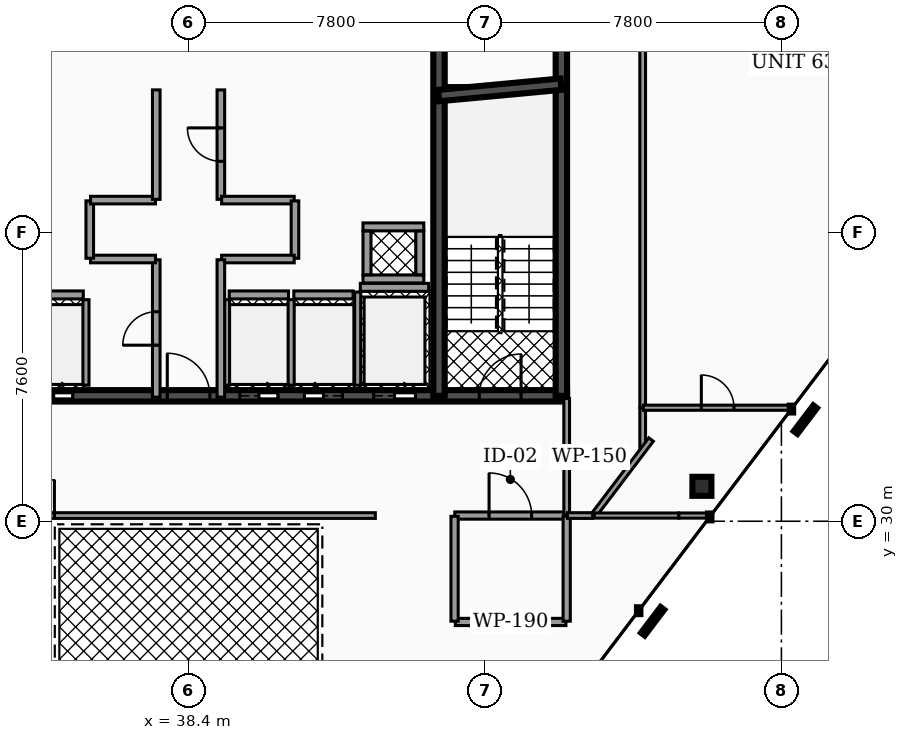
"""IFC4 building model, lengths in metres.
Left out: names, types, materials, properties, quantities, classifications, styles, units other than length and angle.
Written with IfcOpenShell. Run it as: python <this file> out.ifc"""

import sys

from ifc_helpers import new_model, si_unit, direction, frame, frame_2d, origin, origin_2d, place, context, subcontext, project, spatial, rectangle, hollow_rectangle, extrude, element, fill, save


model = new_model("IFC4")
c1 = context("Model", 3, precision=1e-05, world=origin(), true_north=direction((0.0, 1.0)))
c2 = subcontext(c1, "Body", "Model", "MODEL_VIEW")
j1 = project(units=[si_unit("LENGTHUNIT", "METRE"), si_unit("PLANEANGLEUNIT", "RADIAN")], contexts=[c1])
p1 = place(None, origin())
s1 = spatial("IfcSite", under=j1, at=p1, CompositionType="ELEMENT")
p2 = place(p1, origin())
s2 = spatial("IfcBuilding", under=s1, at=p2, CompositionType="ELEMENT")
p3 = place(p2, frame((0.0, 0.0, 249.56)))
s3 = spatial("IfcBuildingStorey", under=s2, at=p3, CompositionType="ELEMENT", Elevation=249.56)
p4 = place(p3, frame((28.5, 33.3, 0.0), z_axis=(0.0, 0.0, 1.0), x_axis=(1.0, 0.0, 0.0)))
e1 = element("IfcWall", 1, at=p4, inside=s3, PredefinedType="SHEAR", context=c2, shape_type="SweptSolid", body=[
    extrude(rectangle(XDim=19.86, YDim=0.3, at=frame_2d((9.93, 0.0))), origin(), (0.0, 0.0, 1.0), 3.05),
])
p5 = place(p4, frame((3.93, 0.0, 0.0)))
e2 = element("IfcOpeningElement", 2, at=p5, cuts=e1, PredefinedType="OPENING", context=c2, shape_type="SweptSolid", body=[
    extrude(rectangle(XDim=1.1, YDim=2.15, at=frame_2d((0.55, 1.075))), frame((0.0, 0.16, 0.0), z_axis=(0.0, -1.0, 0.0), x_axis=(1.0, 0.0, 0.0)), (0.0, 0.0, 1.0), 0.32),
])
p6 = place(p4, frame((14.77, 0.0, 0.0)))
e3 = element("IfcOpeningElement", 3, at=p6, cuts=e1, PredefinedType="OPENING", context=c2, shape_type="SweptSolid", body=[
    extrude(rectangle(XDim=1.1, YDim=2.15, at=frame_2d((0.55, 1.075))), frame((0.0, 0.16, 0.0), z_axis=(0.0, -1.0, 0.0), x_axis=(1.0, 0.0, 0.0)), (0.0, 0.0, 1.0), 0.32),
])
p7 = place(p4, frame((11.25, 0.0, 0.0)))
e4 = element("IfcOpeningElement", 4, at=p7, cuts=e1, PredefinedType="OPENING", context=c2, shape_type="SweptSolid", body=[
    extrude(rectangle(XDim=1.0, YDim=2.1, at=frame_2d((0.5, 1.05))), frame((0.0, 0.16, 0.0), z_axis=(0.0, -1.0, 0.0), x_axis=(1.0, 0.0, 0.0)), (0.0, 0.0, 1.0), 0.32),
])
p8 = place(p4, frame((12.95, 0.0, 0.0)))
e5 = element("IfcOpeningElement", 5, at=p8, cuts=e1, PredefinedType="OPENING", context=c2, shape_type="SweptSolid", body=[
    extrude(rectangle(XDim=1.0, YDim=2.1, at=frame_2d((0.5, 1.05))), frame((0.0, 0.16, 0.0), z_axis=(0.0, -1.0, 0.0), x_axis=(1.0, 0.0, 0.0)), (0.0, 0.0, 1.0), 0.32),
])
p9 = place(p4, frame((5.85, 0.0, 0.0)))
e6 = element("IfcOpeningElement", 6, at=p9, cuts=e1, PredefinedType="OPENING", context=c2, shape_type="SweptSolid", body=[
    extrude(rectangle(XDim=1.0, YDim=2.1, at=frame_2d((0.5, 1.05))), frame((0.0, 0.16, 0.0), z_axis=(0.0, -1.0, 0.0), x_axis=(1.0, 0.0, 0.0)), (0.0, 0.0, 1.0), 0.32),
])
p10 = place(p4, frame((1.21, 0.0, 0.0)))
e7 = element("IfcOpeningElement", 7, at=p10, cuts=e1, PredefinedType="OPENING", context=c2, shape_type="SweptSolid", body=[
    extrude(rectangle(XDim=1.1, YDim=2.2, at=frame_2d((0.55, 1.1))), frame((0.0, 0.16, 0.0), z_axis=(0.0, -1.0, 0.0), x_axis=(1.0, 0.0, 0.0)), (0.0, 0.0, 1.0), 0.32),
])
p11 = place(p4, frame((9.34, 0.0, 0.0)))
e8 = element("IfcOpeningElement", 8, at=p11, cuts=e1, PredefinedType="OPENING", context=c2, shape_type="SweptSolid", body=[
    extrude(rectangle(XDim=1.12, YDim=2.05, at=frame_2d((0.56, 1.025))), frame((0.0, 0.16, 0.0), z_axis=(0.0, -1.0, 0.0), x_axis=(1.0, 0.0, 0.0)), (0.0, 0.0, 1.0), 0.32),
])
p12 = place(p4, frame((17.55, 0.0, 0.0)))
e9 = element("IfcOpeningElement", 9, at=p12, cuts=e1, PredefinedType="OPENING", context=c2, shape_type="SweptSolid", body=[
    extrude(rectangle(XDim=1.1, YDim=2.2, at=frame_2d((0.55, 1.1))), frame((0.0, 0.16, 0.0), z_axis=(0.0, -1.0, 0.0), x_axis=(1.0, 0.0, 0.0)), (0.0, 0.0, 1.0), 0.32),
])
for number, where, z_axis, x_axis in (
    (10, (44.99, 33.3, 0.0), (0.0, 0.0, 1.0), (0.0, 1.0, 0.0)),
    (11, (48.21, 33.3, 0.0), (0.0, 0.0, 1.0), (0.0, 1.0, 0.0)),
):
    element("IfcWall", number, at=place(p3, frame(where, z_axis=z_axis, x_axis=x_axis)), inside=s3, PredefinedType="SHEAR", context=c2, shape_type="SweptSolid", body=[
        extrude(rectangle(XDim=10.1, YDim=0.3, at=frame_2d((5.05, 0.0))), origin(), (0.0, 0.0, 1.0), 3.05),
    ])
p13 = place(p3, frame((44.98, 41.2, 0.0), z_axis=(0.0, 0.0, 1.0), x_axis=(0.995686468965, 0.09278176286, 0.0)))
e12 = element("IfcWall", 12, at=p13, inside=s3, PredefinedType="SHEAR", context=c2, shape_type="SweptSolid", body=[
    extrude(rectangle(XDim=3.234, YDim=0.3, at=frame_2d((1.617, 0.0))), origin(), (0.0, 0.0, 1.0), 3.05),
])
p14 = place(p3, frame((51.909, 30.919, 0.0), z_axis=(-0.029348226726, 0.032546943535, 0.999039227485), x_axis=(-0.742658689726, -0.669670120712, 0.0)))
e13 = element("IfcColumn", 13, at=p14, inside=s3, PredefinedType="COLUMN", context=c2, shape_type="SweptSolid", body=[
    extrude(hollow_rectangle(XDim=0.5, YDim=0.5, WallThickness=0.025, at=origin_2d()), origin(), (0.0, 0.0, 1.0), 3.053),
])
p15 = place(p3, frame((42.92, 36.155, 0.0), z_axis=(0.0, 0.0, 1.0), x_axis=(1.0, 0.0, 0.0)))
e14 = element("IfcWall", 14, at=p15, inside=s3, PredefinedType="SOLIDWALL", context=c2, shape_type="SweptSolid", body=[
    extrude(rectangle(XDim=1.8, YDim=0.21, at=frame_2d((0.9, 0.0))), origin(), (0.0, 0.0, 1.0), 3.05),
])
p16 = place(p3, frame((42.85, 33.58, 0.0), z_axis=(0.0, 0.0, 1.0), x_axis=(0.0, 1.0, 0.0)))
e15 = element("IfcWall", 15, at=p16, inside=s3, PredefinedType="SOLIDWALL", context=c2, shape_type="SweptSolid", body=[
    extrude(rectangle(XDim=2.45, YDim=0.16, at=frame_2d((1.225, 0.0))), origin(), (0.0, 0.0, 1.0), 3.05),
])
p17 = place(p3, frame((39.47, 35.955, 0.0), z_axis=(0.0, 0.0, 1.0), x_axis=(1.0, 0.0, 0.0)))
e16 = element("IfcWall", 16, at=p17, inside=s3, PredefinedType="SOLIDWALL", context=c2, shape_type="SweptSolid", body=[
    extrude(rectangle(XDim=1.56, YDim=0.21, at=frame_2d((0.78, 0.0))), origin(), (0.0, 0.0, 1.0), 3.05),
])
for number, where, z_axis, x_axis in (
    (17, (39.4, 33.58, 0.0), (0.0, 0.0, 1.0), (0.0, 1.0, 0.0)),
    (18, (41.1, 33.58, 0.0), (0.0, 0.0, 1.0), (0.0, 1.0, 0.0)),
):
    element("IfcWall", number, at=place(p3, frame(where, z_axis=z_axis, x_axis=x_axis)), inside=s3, PredefinedType="SOLIDWALL", context=c2, shape_type="SweptSolid", body=[
        extrude(rectangle(XDim=2.25, YDim=0.16, at=frame_2d((1.125, 0.0))), origin(), (0.0, 0.0, 1.0), 3.05),
    ])
p18 = place(p3, frame((41.17, 35.955, 0.0), z_axis=(0.0, 0.0, 1.0), x_axis=(1.0, 0.0, 0.0)))
e19 = element("IfcWall", 19, at=p18, inside=s3, PredefinedType="SOLIDWALL", context=c2, shape_type="SweptSolid", body=[
    extrude(rectangle(XDim=1.56, YDim=0.21, at=frame_2d((0.78, 0.0))), origin(), (0.0, 0.0, 1.0), 3.05),
])
p19 = place(p3, frame((34.07, 35.955, 0.0), z_axis=(0.0, 0.0, 1.0), x_axis=(1.0, 0.0, 0.0)))
e20 = element("IfcWall", 20, at=p19, inside=s3, PredefinedType="SOLIDWALL", context=c2, shape_type="SweptSolid", body=[
    extrude(rectangle(XDim=1.56, YDim=0.21, at=frame_2d((0.78, 0.0))), origin(), (0.0, 0.0, 1.0), 3.05),
])
p20 = place(p3, frame((35.7, 33.58, 0.0), z_axis=(0.0, 0.0, 1.0), x_axis=(0.0, 1.0, 0.0)))
e21 = element("IfcWall", 21, at=p20, inside=s3, PredefinedType="SOLIDWALL", context=c2, shape_type="SweptSolid", body=[
    extrude(rectangle(XDim=2.25, YDim=0.16, at=frame_2d((1.125, 0.0))), origin(), (0.0, 0.0, 1.0), 3.05),
])
for number, where, z_axis, x_axis in (
    (22, (42.99, 36.375, 0.0), (0.0, 0.0, 1.0), (1.0, 0.0, 0.0)),
    (23, (42.99, 37.745, 0.0), (0.0, 0.0, 1.0), (1.0, 0.0, 0.0)),
):
    element("IfcWall", number, at=place(p3, frame(where, z_axis=z_axis, x_axis=x_axis)), inside=s3, PredefinedType="SOLIDWALL", context=c2, shape_type="SweptSolid", body=[
        extrude(rectangle(XDim=1.6, YDim=0.21, at=frame_2d((0.8, 0.0))), origin(), (0.0, 0.0, 1.0), 3.05),
    ])
for number, where, z_axis, x_axis in (
    (24, (43.095, 36.485, 0.0), (0.0, 0.0, 1.0), (0.0, 1.0, 0.0)),
    (25, (44.485, 36.485, 0.0), (0.0, 0.0, 1.0), (0.0, 1.0, 0.0)),
):
    element("IfcWall", number, at=place(p3, frame(where, z_axis=z_axis, x_axis=x_axis)), inside=s3, PredefinedType="SOLIDWALL", context=c2, shape_type="SweptSolid", body=[
        extrude(rectangle(XDim=1.15, YDim=0.21, at=frame_2d((0.575, 0.0))), origin(), (0.0, 0.0, 1.0), 3.05),
    ])
p21 = place(p3, frame((37.55, 33.265, 0.0), z_axis=(0.0, 0.0, 1.0), x_axis=(0.0, 1.0, 0.0)))
e26 = element("IfcWall", 26, at=p21, inside=s3, PredefinedType="PARTITIONING", context=c2, shape_type="SweptSolid", body=[
    extrude(rectangle(XDim=3.615, YDim=0.2, at=frame_2d((1.808, 0.0))), origin(), (0.0, 0.0, 1.0), 2.2),
])
p22 = place(p21, frame((1.367, 0.0, 0.0)))
e27 = element("IfcOpeningElement", 27, at=p22, cuts=e26, PredefinedType="OPENING", context=c2, shape_type="SweptSolid", body=[
    extrude(rectangle(XDim=0.88, YDim=2.05, at=frame_2d((0.44, 1.025))), frame((0.0, 0.11, 0.0), z_axis=(0.0, -1.0, 0.0), x_axis=(1.0, 0.0, 0.0)), (0.0, 0.0, 1.0), 0.22),
])
p23 = place(p3, frame((35.82, 36.9, 0.0), z_axis=(0.0, 0.0, 1.0), x_axis=(1.0, 0.0, 0.0)))
e28 = element("IfcWall", 28, at=p23, inside=s3, PredefinedType="PARTITIONING", context=c2, shape_type="SweptSolid", body=[
    extrude(rectangle(XDim=1.71, YDim=0.2, at=frame_2d((0.855, 0.0))), origin(), (0.0, 0.0, 1.0), 2.2),
])
p24 = place(p3, frame((35.8, 36.92, 0.0), z_axis=(0.0, 0.0, 1.0), x_axis=(0.0, 1.0, 0.0)))
e29 = element("IfcWall", 29, at=p24, inside=s3, PredefinedType="PARTITIONING", context=c2, shape_type="SweptSolid", body=[
    extrude(rectangle(XDim=1.51, YDim=0.2, at=frame_2d((0.755, 0.0))), origin(), (0.0, 0.0, 1.0), 2.2),
])
p25 = place(p3, frame((35.82, 38.45, 0.0), z_axis=(0.0, 0.0, 1.0), x_axis=(1.0, 0.0, 0.0)))
e30 = element("IfcWall", 30, at=p25, inside=s3, PredefinedType="PARTITIONING", context=c2, shape_type="SweptSolid", body=[
    extrude(rectangle(XDim=1.71, YDim=0.2, at=frame_2d((0.855, 0.0))), origin(), (0.0, 0.0, 1.0), 2.2),
])
p26 = place(p3, frame((37.55, 38.47, 0.0), z_axis=(0.0, 0.0, 1.0), x_axis=(0.0, 1.0, 0.0)))
e31 = element("IfcWall", 31, at=p26, inside=s3, PredefinedType="PARTITIONING", context=c2, shape_type="SweptSolid", body=[
    extrude(rectangle(XDim=2.88, YDim=0.2, at=frame_2d((1.44, 0.0))), origin(), (0.0, 0.0, 1.0), 2.2),
])
p27 = place(p3, frame((39.25, 38.47, 0.0), z_axis=(0.0, 0.0, 1.0), x_axis=(0.0, 1.0, 0.0)))
e32 = element("IfcWall", 32, at=p27, inside=s3, PredefinedType="PARTITIONING", context=c2, shape_type="SweptSolid", body=[
    extrude(rectangle(XDim=2.88, YDim=0.2, at=frame_2d((1.44, 0.0))), origin(), (0.0, 0.0, 1.0), 2.2),
])
p28 = place(p27, frame((1.0, 0.0, 0.0)))
e33 = element("IfcOpeningElement", 33, at=p28, cuts=e32, PredefinedType="OPENING", context=c2, shape_type="SweptSolid", body=[
    extrude(rectangle(XDim=0.88, YDim=2.05, at=frame_2d((0.44, 1.025))), frame((0.0, 0.11, 0.0), z_axis=(0.0, -1.0, 0.0), x_axis=(1.0, 0.0, 0.0)), (0.0, 0.0, 1.0), 0.22),
])
p29 = place(p3, frame((39.27, 38.45, 0.0), z_axis=(0.0, 0.0, 1.0), x_axis=(1.0, 0.0, 0.0)))
e34 = element("IfcWall", 34, at=p29, inside=s3, PredefinedType="PARTITIONING", context=c2, shape_type="SweptSolid", body=[
    extrude(rectangle(XDim=1.91, YDim=0.2, at=frame_2d((0.955, 0.0))), origin(), (0.0, 0.0, 1.0), 2.2),
])
p30 = place(p3, frame((41.2, 36.92, 0.0), z_axis=(0.0, 0.0, 1.0), x_axis=(0.0, 1.0, 0.0)))
e35 = element("IfcWall", 35, at=p30, inside=s3, PredefinedType="PARTITIONING", context=c2, shape_type="SweptSolid", body=[
    extrude(rectangle(XDim=1.51, YDim=0.2, at=frame_2d((0.755, 0.0))), origin(), (0.0, 0.0, 1.0), 2.2),
])
p31 = place(p3, frame((39.27, 36.9, 0.0), z_axis=(0.0, 0.0, 1.0), x_axis=(1.0, 0.0, 0.0)))
e36 = element("IfcWall", 36, at=p31, inside=s3, PredefinedType="PARTITIONING", context=c2, shape_type="SweptSolid", body=[
    extrude(rectangle(XDim=1.91, YDim=0.2, at=frame_2d((0.955, 0.0))), origin(), (0.0, 0.0, 1.0), 2.2),
])
p32 = place(p3, frame((39.25, 33.265, 0.0), z_axis=(0.0, 0.0, 1.0), x_axis=(0.0, 1.0, 0.0)))
e37 = element("IfcWall", 37, at=p32, inside=s3, PredefinedType="PARTITIONING", context=c2, shape_type="SweptSolid", body=[
    extrude(rectangle(XDim=3.615, YDim=0.2, at=frame_2d((1.808, 0.0))), origin(), (0.0, 0.0, 1.0), 2.2),
])
p33 = place(p3, frame((45.405, 30.15, 0.0), z_axis=(0.0, 0.0, 1.0), x_axis=(1.0, 0.0, 0.0)))
e38 = element("IfcWall", 38, at=p33, inside=s3, PredefinedType="PARTITIONING", context=c2, shape_type="SweptSolid", body=[
    extrude(rectangle(XDim=2.925, YDim=0.19, at=frame_2d((1.462, 0.0))), origin(), (0.0, 0.0, 1.0), 2.2),
])
p34 = place(p33, frame((0.903, 0.0, 0.0)))
e39 = element("IfcOpeningElement", 39, at=p34, cuts=e38, PredefinedType="OPENING", context=c2, shape_type="SweptSolid", body=[
    extrude(rectangle(XDim=1.12, YDim=2.05, at=frame_2d((0.56, 1.025))), frame((0.0, 0.105, 0.0), z_axis=(0.0, -1.0, 0.0), x_axis=(1.0, 0.0, 0.0)), (0.0, 0.0, 1.0), 0.21),
])
p35 = place(p3, frame((48.35, 30.17, 0.0), z_axis=(0.0, 0.0, 1.0), x_axis=(0.0, 1.0, 0.0)))
e40 = element("IfcWall", 40, at=p35, inside=s3, PredefinedType="PARTITIONING", context=c2, shape_type="SweptSolid", body=[
    extrude(rectangle(XDim=3.06, YDim=0.15, at=frame_2d((1.53, 0.0))), origin(), (0.0, 0.0, 1.0), 2.2),
])
p36 = place(p3, frame((33.485, 30.15, 0.0), z_axis=(0.0, 0.0, 1.0), x_axis=(1.0, 0.0, 0.0)))
e41 = element("IfcWall", 41, at=p36, inside=s3, PredefinedType="PARTITIONING", context=c2, shape_type="SweptSolid", body=[
    extrude(rectangle(XDim=9.83, YDim=0.15, at=frame_2d((4.915, 0.0))), origin(), (0.0, 0.0, 1.0), 2.2),
])
p37 = place(p36, frame((0.445, 0.0, 0.0)))
e42 = element("IfcOpeningElement", 42, at=p37, cuts=e41, PredefinedType="OPENING", context=c2, shape_type="SweptSolid", body=[
    extrude(rectangle(XDim=0.94, YDim=2.05, at=frame_2d((0.47, 1.025))), frame((0.0, 0.085, 0.0), z_axis=(0.0, -1.0, 0.0), x_axis=(1.0, 0.0, 0.0)), (0.0, 0.0, 1.0), 0.17),
])
p38 = place(p3, frame((45.42, 27.35, 0.0), z_axis=(0.0, 0.0, 1.0), x_axis=(1.0, 0.0, 0.0)))
e43 = element("IfcWall", 43, at=p38, inside=s3, PredefinedType="PARTITIONING", context=c2, shape_type="SweptSolid", body=[
    extrude(rectangle(XDim=2.91, YDim=0.19, at=frame_2d((1.455, 0.0))), origin(), (0.0, 0.0, 1.0), 2.2),
])
for number, where, z_axis, x_axis in (
    (44, (45.4, 27.37, 0.0), (0.0, 0.0, 1.0), (0.0, 1.0, 0.0)),
    (45, (48.35, 27.37, 0.0), (0.0, 0.0, 1.0), (0.0, 1.0, 0.0)),
):
    element("IfcWall", number, at=place(p3, frame(where, z_axis=z_axis, x_axis=x_axis)), inside=s3, PredefinedType="PARTITIONING", context=c2, shape_type="SweptSolid", body=[
        extrude(rectangle(XDim=2.76, YDim=0.19, at=frame_2d((1.38, 0.0))), origin(), (0.0, 0.0, 1.0), 2.2),
    ])
p39 = place(p3, frame((48.37, 30.15, 0.0), z_axis=(0.0, 0.0, 1.0), x_axis=(1.0, 0.0, 0.0)))
e46 = element("IfcWall", 46, at=p39, inside=s3, PredefinedType="PARTITIONING", context=c2, shape_type="SweptSolid", body=[
    extrude(rectangle(XDim=0.665, YDim=0.15, at=frame_2d((0.333, 0.0))), origin(), (0.0, 0.0, 1.0), 2.2),
])
p40 = place(p3, frame((50.35, 32.992, 0.0), z_axis=(0.0, 0.0, 1.0), x_axis=(0.0, 1.0, 0.0)))
e47 = element("IfcWall", 47, at=p40, inside=s3, PredefinedType="PARTITIONING", context=c2, shape_type="SweptSolid", body=[
    extrude(rectangle(XDim=10.558, YDim=0.15, at=frame_2d((5.279, 0.0))), origin(), (0.0, 0.0, 1.0), 2.2),
])
p41 = place(p3, frame((50.35, 31.874, 0.0), z_axis=(0.0, 0.0, 1.0), x_axis=(0.0, 1.0, 0.0)))
e48 = element("IfcWall", 48, at=p41, inside=s3, PredefinedType="PARTITIONING", context=c2, shape_type="SweptSolid", body=[
    extrude(rectangle(XDim=1.109, YDim=0.15, at=frame_2d((0.554, 0.0))), origin(), (0.0, 0.0, 1.0), 2.2),
])
p42 = place(p3, frame((49.067, 30.166, 0.0), z_axis=(0.0, 0.0, 1.0), x_axis=(0.603916229015, 0.797047795513, 0.0)))
e49 = element("IfcWall", 49, at=p42, inside=s3, PredefinedType="PARTITIONING", context=c2, shape_type="SweptSolid", body=[
    extrude(rectangle(XDim=2.489, YDim=0.15, at=frame_2d((1.245, 0.0))), origin(), (0.0, 0.0, 1.0), 2.2),
])
p43 = place(p3, frame((49.075, 30.15, 0.0), z_axis=(0.0, 0.0, 1.0), x_axis=(1.0, 0.0, 0.0)))
e50 = element("IfcWall", 50, at=p43, inside=s3, PredefinedType="PARTITIONING", context=c2, shape_type="SweptSolid", body=[
    extrude(rectangle(XDim=2.225, YDim=0.135, at=frame_2d((1.112, 0.0))), origin(), (0.0, 0.0, 1.0), 2.2),
])
p44 = place(p3, frame((51.3, 30.15, 0.0), z_axis=(0.0, 0.0, 1.0), x_axis=(1.0, 0.0, 0.0)))
e51 = element("IfcWall", 51, at=p44, inside=s3, PredefinedType="PARTITIONING", context=c2, shape_type="SweptSolid", body=[
    extrude(rectangle(XDim=0.827, YDim=0.135, at=frame_2d((0.413, 0.0))), origin(), (0.0, 0.0, 1.0), 2.2),
])
p45 = place(p3, frame((50.37, 32.988, 0.0), z_axis=(0.0, 0.0, 1.0), x_axis=(1.0, 0.0, 0.0)))
e52 = element("IfcWall", 52, at=p45, inside=s3, PredefinedType="PARTITIONING", context=c2, shape_type="SweptSolid", body=[
    extrude(rectangle(XDim=3.906, YDim=0.135, at=frame_2d((1.953, 0.0))), origin(), (0.0, 0.0, 1.0), 2.2),
])
p46 = place(p45, frame((1.523, 0.0, 0.0)))
e53 = element("IfcOpeningElement", 53, at=p46, cuts=e52, PredefinedType="OPENING", context=c2, shape_type="SweptSolid", body=[
    extrude(rectangle(XDim=0.86, YDim=2.05, at=frame_2d((0.43, 1.025))), frame((0.0, 0.077, 0.0), z_axis=(0.0, -1.0, 0.0), x_axis=(1.0, 0.0, 0.0)), (0.0, 0.0, 1.0), 0.155),
])
p47 = place(p6, origin())
e54 = element("IfcDoor", 54, at=p47, inside=s3, OperationType="SLIDING_TO_RIGHT", PredefinedType="DOOR", context=c2, shape_type="SweptSolid", body=[
    extrude(rectangle(XDim=1.1, YDim=2.15, at=frame_2d((0.55, 1.075))), frame((0.0, 0.025, 0.0), z_axis=(0.0, -1.0, 0.0), x_axis=(1.0, 0.0, 0.0)), (0.0, 0.0, 1.0), 0.05),
])
fill(e3, e54)
p48 = place(p7, origin())
e55 = element("IfcDoor", 55, at=p48, inside=s3, OperationType="SLIDING_TO_RIGHT", PredefinedType="DOOR", context=c2, shape_type="SweptSolid", body=[
    extrude(rectangle(XDim=1.0, YDim=2.1, at=frame_2d((0.5, 1.05))), frame((0.0, 0.025, 0.0), z_axis=(0.0, -1.0, 0.0), x_axis=(1.0, 0.0, 0.0)), (0.0, 0.0, 1.0), 0.05),
])
fill(e4, e55)
p49 = place(p8, origin())
e56 = element("IfcDoor", 56, at=p49, inside=s3, OperationType="SLIDING_TO_LEFT", PredefinedType="DOOR", context=c2, shape_type="SweptSolid", body=[
    extrude(rectangle(XDim=1.0, YDim=2.1, at=frame_2d((0.5, 1.05))), frame((0.0, 0.025, 0.0), z_axis=(0.0, -1.0, 0.0), x_axis=(1.0, 0.0, 0.0)), (0.0, 0.0, 1.0), 0.05),
])
fill(e5, e56)
p50 = place(p9, origin())
e57 = element("IfcDoor", 57, at=p50, inside=s3, OperationType="SLIDING_TO_RIGHT", PredefinedType="DOOR", context=c2, shape_type="SweptSolid", body=[
    extrude(rectangle(XDim=1.0, YDim=2.1, at=frame_2d((0.5, 1.05))), frame((0.0, 0.025, 0.0), z_axis=(0.0, -1.0, 0.0), x_axis=(1.0, 0.0, 0.0)), (0.0, 0.0, 1.0), 0.05),
])
fill(e6, e57)
p51 = place(p11, origin())
e58 = element("IfcDoor", 58, at=p51, inside=s3, OperationType="SINGLE_SWING_LEFT", PredefinedType="DOOR", context=c2, shape_type="SweptSolid", body=[
    extrude(rectangle(XDim=1.12, YDim=2.05, at=frame_2d((0.56, 1.025))), frame((0.0, 0.025, 0.0), z_axis=(0.0, -1.0, 0.0), x_axis=(1.0, 0.0, 0.0)), (0.0, 0.0, 1.0), 0.05),
])
fill(e8, e58)
p52 = place(p12, origin())
e59 = element("IfcDoor", 59, at=p52, inside=s3, OperationType="SINGLE_SWING_RIGHT", PredefinedType="DOOR", context=c2, shape_type="SweptSolid", body=[
    extrude(rectangle(XDim=1.1, YDim=2.2, at=frame_2d((0.55, 1.1))), frame((0.0, 0.025, 0.0), z_axis=(0.0, -1.0, 0.0), x_axis=(1.0, 0.0, 0.0)), (0.0, 0.0, 1.0), 0.05),
])
fill(e9, e59)
p53 = place(p22, origin())
e60 = element("IfcDoor", 60, at=p53, inside=s3, OperationType="SINGLE_SWING_LEFT", PredefinedType="DOOR", context=c2, shape_type="SweptSolid", body=[
    extrude(rectangle(XDim=0.88, YDim=2.05, at=frame_2d((0.44, 1.025))), frame((0.0, 0.025, 0.0), z_axis=(0.0, -1.0, 0.0), x_axis=(1.0, 0.0, 0.0)), (0.0, 0.0, 1.0), 0.05),
])
fill(e27, e60)
p54 = place(p28, origin())
e61 = element("IfcDoor", 61, at=p54, inside=s3, OperationType="SINGLE_SWING_RIGHT", PredefinedType="DOOR", context=c2, shape_type="SweptSolid", body=[
    extrude(rectangle(XDim=0.88, YDim=2.05, at=frame_2d((0.44, 1.025))), frame((0.0, 0.025, 0.0), z_axis=(0.0, -1.0, 0.0), x_axis=(1.0, 0.0, 0.0)), (0.0, 0.0, 1.0), 0.05),
])
fill(e33, e61)
p55 = place(p34, origin())
e62 = element("IfcDoor", 62, at=p55, inside=s3, OperationType="SINGLE_SWING_LEFT", PredefinedType="DOOR", context=c2, shape_type="SweptSolid", body=[
    extrude(rectangle(XDim=1.12, YDim=2.05, at=frame_2d((0.56, 1.025))), frame((0.0, 0.025, 0.0), z_axis=(0.0, -1.0, 0.0), x_axis=(1.0, 0.0, 0.0)), (0.0, 0.0, 1.0), 0.05),
])
fill(e39, e62)
p56 = place(p37, origin())
e63 = element("IfcDoor", 63, at=p56, inside=s3, OperationType="SINGLE_SWING_RIGHT", PredefinedType="DOOR", context=c2, shape_type="SweptSolid", body=[
    extrude(rectangle(XDim=0.94, YDim=2.05, at=frame_2d((0.47, 1.025))), frame((0.0, 0.025, 0.0), z_axis=(0.0, -1.0, 0.0), x_axis=(1.0, 0.0, 0.0)), (0.0, 0.0, 1.0), 0.05),
])
fill(e42, e63)
p57 = place(p46, origin())
e64 = element("IfcDoor", 64, at=p57, inside=s3, OperationType="SINGLE_SWING_LEFT", PredefinedType="DOOR", context=c2, shape_type="SweptSolid", body=[
    extrude(rectangle(XDim=0.86, YDim=2.05, at=frame_2d((0.43, 1.025))), frame((0.0, 0.025, 0.0), z_axis=(0.0, -1.0, 0.0), x_axis=(1.0, 0.0, 0.0)), (0.0, 0.0, 1.0), 0.05),
])
fill(e53, e64)
save(model, sys.argv[1])
